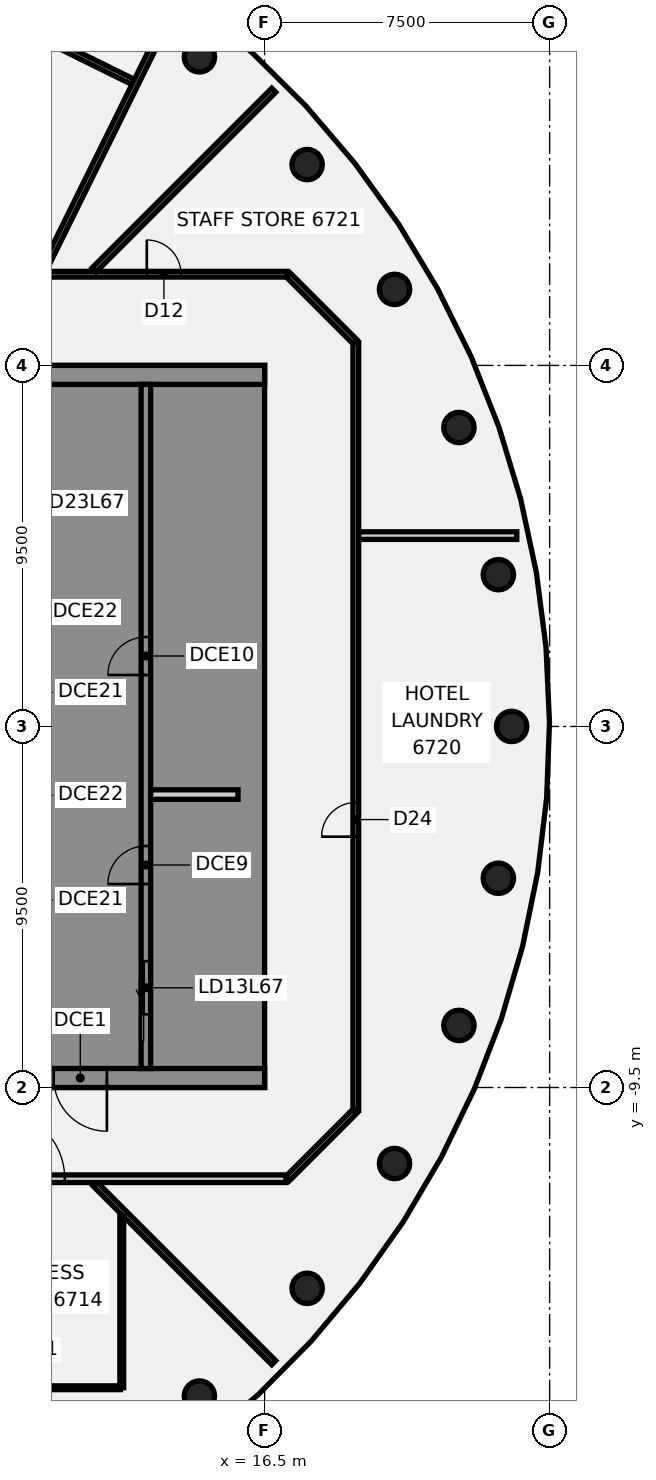
"""IFC4 building model, lengths in metres.
Left out: names, types, materials, properties, quantities, classifications, styles, units other than length and angle.
Written with IfcOpenShell. Run it as: python <this file> out.ifc"""

import sys

from ifc_helpers import new_model, si_unit, direction, frame, frame_2d, origin, origin_2d, place, context, subcontext, project, spatial, polyline, rectangle, circle, outline, extrude, element, fill, save


model = new_model("IFC4")
c1 = context("Model", 3, precision=1e-05, world=origin(), true_north=direction((0.0, 1.0)))
c2 = subcontext(c1, "Body", "Model", "MODEL_VIEW")
j1 = project(units=[si_unit("LENGTHUNIT", "METRE"), si_unit("PLANEANGLEUNIT", "RADIAN")], contexts=[c1])
p1 = place(None, origin())
s1 = spatial("IfcSite", under=j1, at=p1, CompositionType="ELEMENT")
p2 = place(p1, origin())
s2 = spatial("IfcBuilding", under=s1, at=p2, CompositionType="ELEMENT")
p3 = place(p2, frame((0.0, 0.0, 264.0)))
s3 = spatial("IfcBuildingStorey", under=s2, at=p3, CompositionType="ELEMENT", Elevation=264.0)
for number, where, z_axis, x_axis in (
    (1, (23.0, 0.0, -0.14), (0.0, 0.0, 1.0), (1.0, 0.0, 0.0)),
    (2, (22.651, 3.994, -0.14), (0.0, 0.0, 1.0), (1.0, 0.0, 0.0)),
    (3, (21.613, 7.866, -0.14), (0.0, 0.0, 1.0), (1.0, 0.0, 0.0)),
    (4, (19.919, 11.5, -0.14), (0.0, 0.0, 1.0), (1.0, 0.0, 0.0)),
    (5, (17.619, 14.784, -0.14), (0.0, 0.0, 1.0), (1.0, 0.0, 0.0)),
    (6, (14.784, 17.619, -0.14), (0.0, 0.0, 1.0), (1.0, 0.0, 0.0)),
    (7, (14.784, -17.619, -0.14), (0.0, 0.0, 1.0), (1.0, 0.0, 0.0)),
    (8, (17.619, -14.784, -0.14), (0.0, 0.0, 1.0), (1.0, 0.0, 0.0)),
    (9, (19.919, -11.5, -0.14), (0.0, 0.0, 1.0), (1.0, 0.0, 0.0)),
    (10, (21.613, -7.866, -0.14), (0.0, 0.0, 1.0), (1.0, 0.0, 0.0)),
    (11, (22.651, -3.994, -0.14), (0.0, 0.0, 1.0), (1.0, 0.0, 0.0)),
):
    element("IfcColumn", number, at=place(p3, frame(where, z_axis=z_axis, x_axis=x_axis)), inside=s3, PredefinedType="COLUMN", context=c2, shape_type="SweptSolid", body=[
        extrude(circle(Radius=0.4, at=origin_2d()), origin(), (0.0, 0.0, 1.0), 3.6),
    ])
p4 = place(p3, frame((12.034, -12.034, 0.0), z_axis=(0.0, 0.0, 1.0), x_axis=(0.707106781187, -0.707106781187, 0.0)))
e12 = element("IfcWall", 12, at=p4, inside=s3, PredefinedType="PARTITIONING", context=c2, shape_type="SweptSolid", body=[
    extrude(rectangle(XDim=6.655, YDim=0.15, at=frame_2d((3.328, 0.0))), origin(), (0.0, 0.0, 1.0), 2.864),
])
p5 = place(p3, frame((17.128, 11.872, 0.0), z_axis=(0.0, 0.0, 1.0), x_axis=(0.707106781187, -0.707106781187, 0.0)))
e13 = element("IfcWall", 13, at=p5, inside=s3, PredefinedType="PARTITIONING", context=c2, shape_type="SweptSolid", body=[
    extrude(rectangle(XDim=2.465, YDim=0.15, at=frame_2d((1.232, 0.0))), origin(), (0.0, 0.0, 1.0), 2.864),
])
p6 = place(p3, frame((0.327, 23.233, 0.0), z_axis=(0.0, 0.0, 1.0), x_axis=(0.896732994019, -0.442571957355, 0.0)))
e14 = element("IfcWall", 14, at=p6, inside=s3, PredefinedType="PARTITIONING", context=c2, shape_type="SweptSolid", body=[
    extrude(rectangle(XDim=14.178, YDim=0.15, at=frame_2d((7.089, 0.0))), origin(), (0.0, 0.0, 1.0), 2.864),
])
p7 = place(p6, frame((4.65, 0.0, 0.0)))
e15 = element("IfcOpeningElement", 15, at=p7, cuts=e14, PredefinedType="OPENING", context=c2, shape_type="SweptSolid", body=[
    extrude(rectangle(XDim=0.9, YDim=2.1, at=frame_2d((0.45, 1.05))), frame((0.0, 0.085, 0.0), z_axis=(0.0, -1.0, 0.0), x_axis=(1.0, 0.0, 0.0)), (0.0, 0.0, 1.0), 0.17),
])
p8 = place(p3, frame((-17.1, -11.9, 0.0), z_axis=(0.0, 0.0, 1.0), x_axis=(1.0, 0.0, 0.0)))
e16 = element("IfcWall", 16, at=p8, inside=s3, PredefinedType="PARTITIONING", context=c2, shape_type="SweptSolid", body=[
    extrude(rectangle(XDim=34.165, YDim=0.2, at=frame_2d((17.083, 0.0))), origin(), (0.0, 0.0, 1.0), 2.864),
])
p9 = place(p8, frame((6.1, 0.0, 0.0)))
e17 = element("IfcOpeningElement", 17, at=p9, cuts=e16, PredefinedType="OPENING", context=c2, shape_type="SweptSolid", body=[
    extrude(rectangle(XDim=0.9, YDim=2.1, at=frame_2d((0.45, 1.05))), frame((0.0, 0.11, 0.0), z_axis=(0.0, -1.0, 0.0), x_axis=(1.0, 0.0, 0.0)), (0.0, 0.0, 1.0), 0.22),
])
p10 = place(p8, frame((26.541, 0.0, 0.0)))
e18 = element("IfcOpeningElement", 18, at=p10, cuts=e16, PredefinedType="OPENING", context=c2, shape_type="SweptSolid", body=[
    extrude(rectangle(XDim=1.8, YDim=2.1, at=frame_2d((0.9, 1.05))), frame((0.0, 0.11, 0.0), z_axis=(0.0, -1.0, 0.0), x_axis=(1.0, 0.0, 0.0)), (0.0, 0.0, 1.0), 0.22),
])
p11 = place(p8, frame((17.778, 0.0, 0.0)))
e19 = element("IfcOpeningElement", 19, at=p11, cuts=e16, PredefinedType="OPENING", context=c2, shape_type="SweptSolid", body=[
    extrude(rectangle(XDim=1.8, YDim=2.1, at=frame_2d((0.9, 1.05))), frame((0.0, 0.11, 0.0), z_axis=(0.0, -1.0, 0.0), x_axis=(1.0, 0.0, 0.0)), (0.0, 0.0, 1.0), 0.22),
])
p12 = place(p8, frame((10.359, 0.0, 0.0)))
e20 = element("IfcOpeningElement", 20, at=p12, cuts=e16, PredefinedType="OPENING", context=c2, shape_type="SweptSolid", body=[
    extrude(rectangle(XDim=0.9, YDim=2.1, at=frame_2d((0.45, 1.05))), frame((0.0, 0.11, 0.0), z_axis=(0.0, -1.0, 0.0), x_axis=(1.0, 0.0, 0.0)), (0.0, 0.0, 1.0), 0.22),
])
p13 = place(p8, frame((1.65, 0.0, 0.0)))
e21 = element("IfcOpeningElement", 21, at=p13, cuts=e16, PredefinedType="OPENING", context=c2, shape_type="SweptSolid", body=[
    extrude(rectangle(XDim=0.9, YDim=2.1, at=frame_2d((0.45, 1.05))), frame((0.0, 0.11, 0.0), z_axis=(0.0, -1.0, 0.0), x_axis=(1.0, 0.0, 0.0)), (0.0, 0.0, 1.0), 0.22),
])
p14 = place(p3, frame((-17.065, 11.9, 0.0), z_axis=(0.0, 0.0, 1.0), x_axis=(1.0, 0.0, 0.0)))
e22 = element("IfcWall", 22, at=p14, inside=s3, PredefinedType="PARTITIONING", context=c2, shape_type="SweptSolid", body=[
    extrude(rectangle(XDim=34.165, YDim=0.15, at=frame_2d((17.083, 0.0))), origin(), (0.0, 0.0, 1.0), 2.864),
])
p15 = place(p14, frame((23.057, 0.0, 0.0)))
e23 = element("IfcOpeningElement", 23, at=p15, cuts=e22, PredefinedType="OPENING", context=c2, shape_type="SweptSolid", body=[
    extrude(rectangle(XDim=1.8, YDim=2.1, at=frame_2d((0.9, 1.05))), frame((0.0, 0.085, 0.0), z_axis=(0.0, -1.0, 0.0), x_axis=(1.0, 0.0, 0.0)), (0.0, 0.0, 1.0), 0.17),
])
p16 = place(p14, frame((30.465, 0.0, 0.0)))
e24 = element("IfcOpeningElement", 24, at=p16, cuts=e22, PredefinedType="OPENING", context=c2, shape_type="SweptSolid", body=[
    extrude(rectangle(XDim=0.9, YDim=2.1, at=frame_2d((0.45, 1.05))), frame((0.0, 0.085, 0.0), z_axis=(0.0, -1.0, 0.0), x_axis=(1.0, 0.0, 0.0)), (0.0, 0.0, 1.0), 0.17),
])
p17 = place(p14, frame((11.915, 0.0, 0.0)))
e25 = element("IfcOpeningElement", 25, at=p17, cuts=e22, PredefinedType="OPENING", context=c2, shape_type="SweptSolid", body=[
    extrude(rectangle(XDim=1.8, YDim=2.1, at=frame_2d((0.9, 1.05))), frame((0.0, 0.085, 0.0), z_axis=(0.0, -1.0, 0.0), x_axis=(1.0, 0.0, 0.0)), (0.0, 0.0, 1.0), 0.17),
])
p18 = place(p3, frame((8.276, -17.4, 0.0), z_axis=(0.0, 0.0, 1.0), x_axis=(1.0, 0.0, 0.0)))
e26 = element("IfcWall", 26, at=p18, inside=s3, PredefinedType="PARTITIONING", context=c2, shape_type="SweptSolid", body=[
    extrude(rectangle(XDim=4.43, YDim=0.1, at=frame_2d((2.215, 0.0))), origin(), (0.0, 0.0, 1.0), 2.864),
])
p19 = place(p3, frame((18.955, 5.022, 0.0), z_axis=(0.0, 0.0, 1.0), x_axis=(1.0, 0.0, 0.0)))
e27 = element("IfcWall", 27, at=p19, inside=s3, PredefinedType="PARTITIONING", context=c2, shape_type="SweptSolid", body=[
    extrude(rectangle(XDim=4.181, YDim=0.2, at=frame_2d((2.09, 0.0))), origin(), (0.0, 0.0, 1.0), 2.864),
])
p20 = place(p3, frame((12.01, 12.01, 0.0), z_axis=(0.0, 0.0, 1.0), x_axis=(0.707106781187, 0.707106781187, 0.0)))
e28 = element("IfcWall", 28, at=p20, inside=s3, PredefinedType="PARTITIONING", context=c2, shape_type="SweptSolid", body=[
    extrude(rectangle(XDim=6.691, YDim=0.15, at=frame_2d((3.345, 0.0))), origin(), (0.0, 0.0, 1.0), 2.864),
])
p21 = place(p3, frame((17.1, -11.9, 0.0), z_axis=(0.0, 0.0, 1.0), x_axis=(0.707106781187, 0.707106781187, 0.0)))
e29 = element("IfcWall", 29, at=p21, inside=s3, PredefinedType="PARTITIONING", context=c2, shape_type="SweptSolid", body=[
    extrude(rectangle(XDim=2.505, YDim=0.15, at=frame_2d((1.253, 0.0))), origin(), (0.0, 0.0, 1.0), 2.864),
])
p22 = place(p3, frame((10.672, 11.99, 0.0), z_axis=(0.0, 0.0, 1.0), x_axis=(0.442549118131, 0.896744265686, 0.0)))
e30 = element("IfcWall", 30, at=p22, inside=s3, PredefinedType="PARTITIONING", context=c2, shape_type="SweptSolid", body=[
    extrude(rectangle(XDim=7.819, YDim=0.15, at=frame_2d((3.91, 0.0))), origin(), (0.0, 0.0, 1.0), 2.864),
])
p23 = place(p3, frame((12.741, -17.4, 0.0), z_axis=(0.0, 0.0, 1.0), x_axis=(0.0, 1.0, 0.0)))
e31 = element("IfcWall", 31, at=p23, inside=s3, PredefinedType="PARTITIONING", context=c2, shape_type="SweptSolid", body=[
    extrude(rectangle(XDim=4.519, YDim=0.1, at=frame_2d((2.259, 0.0))), origin(), (0.0, 0.0, 1.0), 2.864),
])
p24 = place(p3, frame((18.9, -10.1, 0.0), z_axis=(0.0, 0.0, 1.0), x_axis=(0.0, 1.0, 0.0)))
e32 = element("IfcWall", 32, at=p24, inside=s3, PredefinedType="PARTITIONING", context=c2, shape_type="SweptSolid", body=[
    extrude(rectangle(XDim=20.2, YDim=0.15, at=frame_2d((10.1, 0.0))), origin(), (0.0, 0.0, 1.0), 2.864),
])
p25 = place(p24, frame((7.2, 0.0, 0.0)))
e33 = element("IfcOpeningElement", 33, at=p25, cuts=e32, PredefinedType="OPENING", context=c2, shape_type="SweptSolid", body=[
    extrude(rectangle(XDim=0.9, YDim=2.1, at=frame_2d((0.45, 1.05))), frame((0.0, 0.085, 0.0), z_axis=(0.0, -1.0, 0.0), x_axis=(1.0, 0.0, 0.0)), (0.0, 0.0, 1.0), 0.17),
])
p26 = place(p3, frame((16.5, -9.25, 0.0), z_axis=(0.0, 0.0, 1.0), x_axis=(-1.0, 0.0, 0.0)))
e34 = element("IfcWall", 34, at=p26, inside=s3, PredefinedType="SHEAR", context=c2, shape_type="SweptSolid", body=[
    extrude(rectangle(XDim=13.0, YDim=0.5, at=frame_2d((6.5, 0.0))), origin(), (0.0, 0.0, 1.0), 3.46),
])
p27 = place(p26, frame((4.15, 0.0, 0.0)))
e35 = element("IfcOpeningElement", 35, at=p27, cuts=e34, PredefinedType="OPENING", context=c2, shape_type="SweptSolid", body=[
    extrude(rectangle(XDim=1.4, YDim=2.1, at=frame_2d((0.7, 1.05))), frame((0.0, 0.26, 0.0), z_axis=(0.0, -1.0, 0.0), x_axis=(1.0, 0.0, 0.0)), (0.0, 0.0, 1.0), 0.52),
])
p28 = place(p26, frame((10.125, 0.0, 0.0)))
e36 = element("IfcOpeningElement", 36, at=p28, cuts=e34, PredefinedType="OPENING", context=c2, shape_type="SweptSolid", body=[
    extrude(rectangle(XDim=1.4, YDim=2.1, at=frame_2d((0.7, 1.05))), frame((0.0, 0.26, 0.0), z_axis=(0.0, -1.0, 0.0), x_axis=(1.0, 0.0, 0.0)), (0.0, 0.0, 1.0), 0.52),
])
p29 = place(p3, origin())
e37 = element("IfcWall", 37, at=p29, inside=s3, PredefinedType="SHEAR", context=c2, shape_type="SweptSolid", body=[
    extrude(outline(polyline([(13.5, -8.125), (13.5, -9.0), (16.0, -9.0), (16.5, -9.0), (16.5, 9.0), (16.0, 9.0), (13.5, 9.0), (13.5, 8.125), (16.0, 8.125), (16.0, 5.625), (13.5, 5.625), (13.5, 5.375), (16.0, 5.375), (16.0, -5.375), (13.5, -5.375), (13.5, -5.625), (16.0, -5.625), (16.0, -8.125), (13.5, -8.125)])), origin(), (0.0, 0.0, 1.0), 3.46),
])
p30 = place(p3, frame((16.5, 9.25, 0.0), z_axis=(0.0, 0.0, 1.0), x_axis=(-1.0, 0.0, 0.0)))
e38 = element("IfcWall", 38, at=p30, inside=s3, PredefinedType="SHEAR", context=c2, shape_type="SweptSolid", body=[
    extrude(rectangle(XDim=13.0, YDim=0.5, at=frame_2d((6.5, 0.0))), origin(), (0.0, 0.0, 1.0), 3.46),
])
p31 = place(p3, frame((13.375, -9.0, 0.0), z_axis=(0.0, 0.0, 1.0), x_axis=(0.0, 1.0, 0.0)))
e39 = element("IfcWall", 39, at=p31, inside=s3, PredefinedType="SHEAR", context=c2, shape_type="SweptSolid", body=[
    extrude(rectangle(XDim=18.0, YDim=0.25, at=frame_2d((9.0, 0.0))), origin(), (0.0, 0.0, 1.0), 3.46),
])
p32 = place(p31, frame((1.425, 0.0, 0.0)))
e40 = element("IfcOpeningElement", 40, at=p32, cuts=e39, PredefinedType="OPENING", context=c2, shape_type="SweptSolid", body=[
    extrude(rectangle(XDim=1.4, YDim=2.1, at=frame_2d((0.7, 1.05))), frame((0.0, 0.135, 0.0), z_axis=(0.0, -1.0, 0.0), x_axis=(1.0, 0.0, 0.0)), (0.0, 0.0, 1.0), 0.27),
])
p33 = place(p31, frame((4.854, 0.0, 0.0)))
e41 = element("IfcOpeningElement", 41, at=p33, cuts=e39, PredefinedType="OPENING", context=c2, shape_type="SweptSolid", body=[
    extrude(rectangle(XDim=1.0, YDim=2.1, at=frame_2d((0.5, 1.05))), frame((0.0, 0.135, 0.0), z_axis=(0.0, -1.0, 0.0), x_axis=(1.0, 0.0, 0.0)), (0.0, 0.0, 1.0), 0.27),
])
p34 = place(p31, frame((10.354, 0.0, 0.0)))
e42 = element("IfcOpeningElement", 42, at=p34, cuts=e39, PredefinedType="OPENING", context=c2, shape_type="SweptSolid", body=[
    extrude(rectangle(XDim=1.0, YDim=2.1, at=frame_2d((0.5, 1.05))), frame((0.0, 0.135, 0.0), z_axis=(0.0, -1.0, 0.0), x_axis=(1.0, 0.0, 0.0)), (0.0, 0.0, 1.0), 0.27),
])
p35 = place(p3, frame((15.8, -1.792, 0.0), z_axis=(0.0, 0.0, 1.0), x_axis=(-1.0, 0.0, 0.0)))
e43 = element("IfcWall", 43, at=p35, inside=s3, PredefinedType="PARTITIONING", context=c2, shape_type="SweptSolid", body=[
    extrude(rectangle(XDim=2.3, YDim=0.25, at=frame_2d((1.15, 0.0))), origin(), (0.0, 0.0, 1.0), 3.46),
])
p36 = place(p10, frame((1.8, 0.0, 0.0), z_axis=(0.0, 0.0, 1.0), x_axis=(-1.0, 0.0, 0.0)))
e44 = element("IfcDoor", 44, at=p36, inside=s3, OperationType="DOUBLE_DOOR_SINGLE_SWING", PredefinedType="DOOR", context=c2, shape_type="SweptSolid", body=[
    extrude(rectangle(XDim=1.8, YDim=2.1, at=frame_2d((0.9, 1.05))), frame((0.0, 0.025, 0.0), z_axis=(0.0, -1.0, 0.0), x_axis=(1.0, 0.0, 0.0)), (0.0, 0.0, 1.0), 0.05),
])
fill(e18, e44)
p37 = place(p16, origin())
e45 = element("IfcDoor", 45, at=p37, inside=s3, OperationType="SINGLE_SWING_LEFT", PredefinedType="DOOR", context=c2, shape_type="SweptSolid", body=[
    extrude(rectangle(XDim=0.9, YDim=2.1, at=frame_2d((0.45, 1.05))), frame((0.0, 0.025, 0.0), z_axis=(0.0, -1.0, 0.0), x_axis=(1.0, 0.0, 0.0)), (0.0, 0.0, 1.0), 0.05),
])
fill(e24, e45)
p38 = place(p25, frame((0.9, 0.0, 0.0), z_axis=(0.0, 0.0, 1.0), x_axis=(-1.0, 0.0, 0.0)))
e46 = element("IfcDoor", 46, at=p38, inside=s3, OperationType="SINGLE_SWING_LEFT", PredefinedType="DOOR", context=c2, shape_type="SweptSolid", body=[
    extrude(rectangle(XDim=0.9, YDim=2.1, at=frame_2d((0.45, 1.05))), frame((0.0, 0.025, 0.0), z_axis=(0.0, -1.0, 0.0), x_axis=(1.0, 0.0, 0.0)), (0.0, 0.0, 1.0), 0.05),
])
fill(e33, e46)
p39 = place(p27, origin())
e47 = element("IfcDoor", 47, at=p39, inside=s3, OperationType="SINGLE_SWING_LEFT", PredefinedType="DOOR", context=c2, shape_type="SweptSolid", body=[
    extrude(rectangle(XDim=1.4, YDim=2.1, at=frame_2d((0.7, 1.05))), frame((0.0, 0.025, 0.0), z_axis=(0.0, -1.0, 0.0), x_axis=(1.0, 0.0, 0.0)), (0.0, 0.0, 1.0), 0.05),
])
fill(e35, e47)
p40 = place(p32, origin())
e48 = element("IfcDoor", 48, at=p40, inside=s3, OperationType="SLIDING_TO_LEFT", PredefinedType="DOOR", context=c2, shape_type="SweptSolid", body=[
    extrude(rectangle(XDim=1.4, YDim=2.1, at=frame_2d((0.7, 1.05))), frame((0.0, 0.025, 0.0), z_axis=(0.0, -1.0, 0.0), x_axis=(1.0, 0.0, 0.0)), (0.0, 0.0, 1.0), 0.05),
])
fill(e40, e48)
p41 = place(p33, origin())
e49 = element("IfcDoor", 49, at=p41, inside=s3, OperationType="SINGLE_SWING_LEFT", PredefinedType="DOOR", context=c2, shape_type="SweptSolid", body=[
    extrude(rectangle(XDim=1.0, YDim=2.1, at=frame_2d((0.5, 1.05))), frame((0.0, 0.025, 0.0), z_axis=(0.0, -1.0, 0.0), x_axis=(1.0, 0.0, 0.0)), (0.0, 0.0, 1.0), 0.05),
])
fill(e41, e49)
p42 = place(p34, origin())
e50 = element("IfcDoor", 50, at=p42, inside=s3, OperationType="SINGLE_SWING_LEFT", PredefinedType="DOOR", context=c2, shape_type="SweptSolid", body=[
    extrude(rectangle(XDim=1.0, YDim=2.1, at=frame_2d((0.5, 1.05))), frame((0.0, 0.025, 0.0), z_axis=(0.0, -1.0, 0.0), x_axis=(1.0, 0.0, 0.0)), (0.0, 0.0, 1.0), 0.05),
])
fill(e42, e50)
save(model, sys.argv[1])
